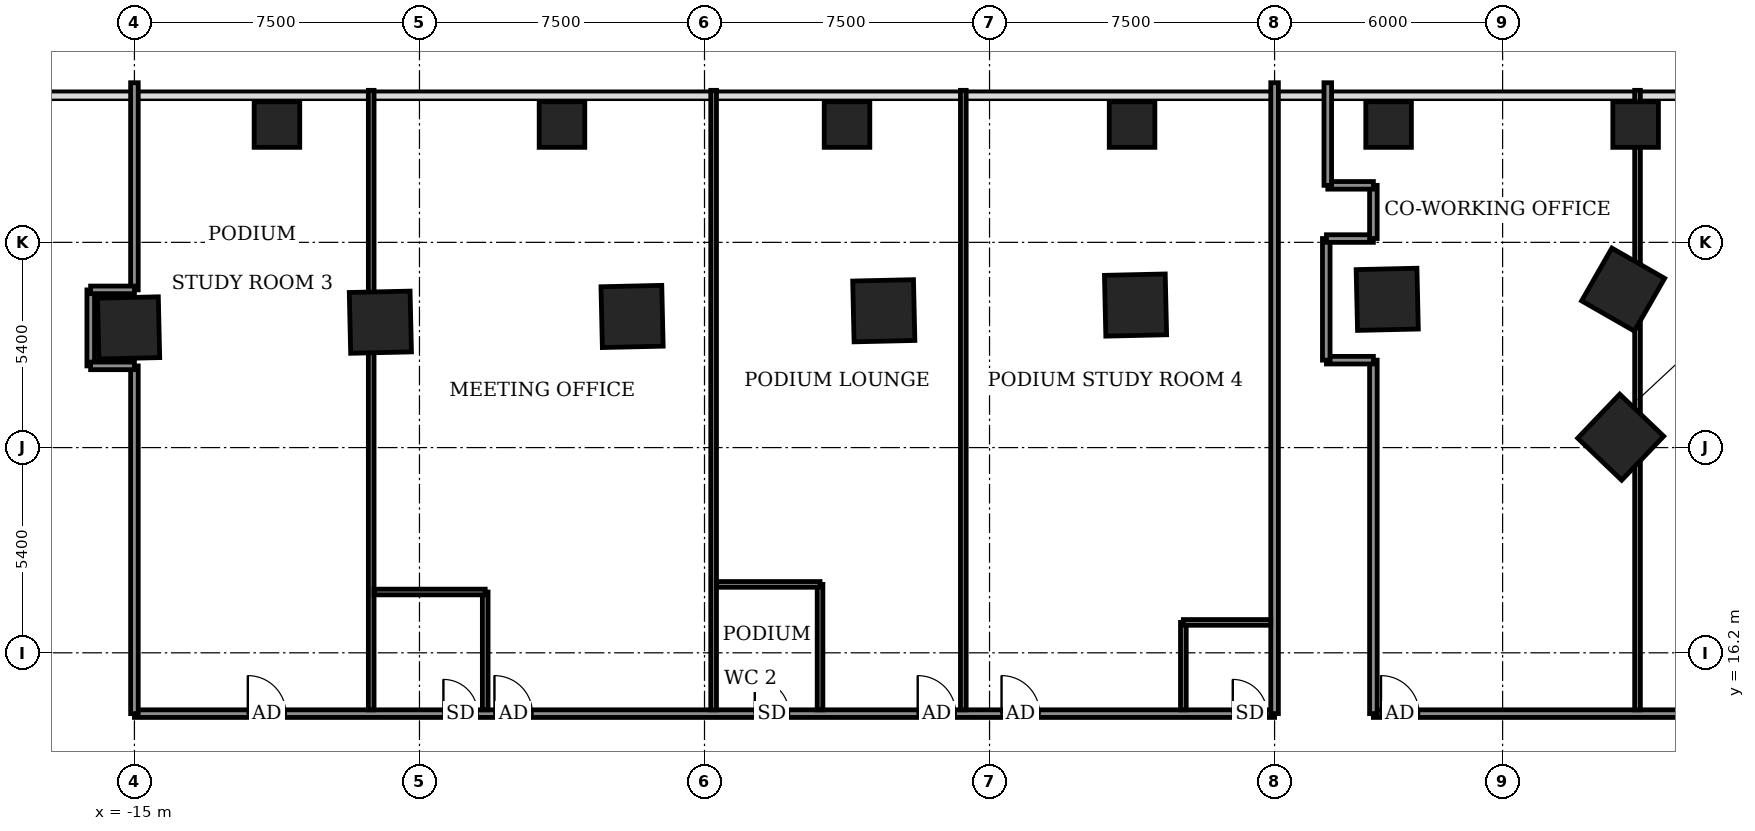
"""IFC4 building model, lengths in metres.
Left out: names, types, materials, properties, quantities, classifications, styles, units other than length and angle.
Written with IfcOpenShell. Run it as: python <this file> out.ifc"""

import sys

from ifc_helpers import new_model, si_unit, direction, frame, frame_2d, origin, origin_2d, place, context, subcontext, project, spatial, rectangle, extrude, element, fill, save


model = new_model("IFC4")
c1 = context("Model", 3, precision=1e-05, world=origin(), true_north=direction((0.0, 1.0)))
c2 = subcontext(c1, "Body", "Model", "MODEL_VIEW")
j1 = project(units=[si_unit("LENGTHUNIT", "METRE"), si_unit("PLANEANGLEUNIT", "RADIAN")], contexts=[c1])
p1 = place(None, origin())
s1 = spatial("IfcSite", under=j1, at=p1, CompositionType="ELEMENT")
p2 = place(p1, origin())
s2 = spatial("IfcBuilding", under=s1, at=p2, CompositionType="ELEMENT")
p3 = place(p2, frame((0.0, 0.0, 11.0)))
s3 = spatial("IfcBuildingStorey", under=s2, at=p3, CompositionType="ELEMENT", Elevation=11.0)
for number, where, z_axis, x_axis in (
    (1, (24.107, 21.874, -0.55), (0.0, 0.0, 1.0), (-0.723, 0.691, 0.0)),
    (2, (24.171, 25.757, -0.55), (0.0, 0.0, 1.0), (-0.868, 0.497, 0.0)),
    (3, (17.964, 25.501, -0.55), (0.0, 0.0, 1.0), (-1.0, -0.023, 0.0)),
    (4, (11.341, 25.35, -0.55), (0.0, 0.0, 1.0), (-1.0, -0.023, 0.0)),
    (5, (4.717, 25.2, -0.55), (0.0, 0.0, 1.0), (-1.0, -0.023, 0.0)),
    (6, (-1.906, 25.05, -0.55), (0.0, 0.0, 1.0), (-1.0, -0.023, 0.0)),
    (7, (-8.529, 24.899, -0.55), (0.0, 0.0, 1.0), (-1.0, -0.023, 0.0)),
    (8, (-15.153, 24.749, -0.55), (0.0, 0.0, 1.0), (-1.0, -0.023, 0.0)),
):
    element("IfcColumn", number, at=place(p3, frame(where, z_axis=z_axis, x_axis=x_axis)), inside=s3, PredefinedType="COLUMN", context=c2, shape_type="SweptSolid", body=[
        extrude(rectangle(XDim=1.6, YDim=1.6, at=origin_2d()), origin(), (0.0, 0.0, 1.0), 5.0),
    ])
for number, where, z_axis, x_axis in (
    (9, (-11.25, 30.1, -0.55), (0.0, 0.0, 1.0), (1.0, 0.0, 0.0)),
    (10, (-3.75, 30.1, -0.55), (0.0, 0.0, 1.0), (1.0, 0.0, 0.0)),
    (11, (3.75, 30.1, -0.55), (0.0, 0.0, 1.0), (1.0, 0.0, 0.0)),
    (12, (11.25, 30.1, -0.55), (0.0, 0.0, 1.0), (1.0, 0.0, 0.0)),
    (13, (18.0, 30.1, -0.55), (0.0, 0.0, 1.0), (1.0, 0.0, 0.0)),
    (14, (24.5, 30.1, -0.55), (0.0, 0.0, 1.0), (1.0, 0.0, 0.0)),
):
    element("IfcColumn", number, at=place(p3, frame(where, z_axis=z_axis, x_axis=x_axis)), inside=s3, PredefinedType="COLUMN", context=c2, shape_type="SweptSolid", body=[
        extrude(rectangle(XDim=1.2, YDim=1.2, at=origin_2d()), origin(), (0.0, 0.0, 1.0), 5.0),
    ])
p4 = place(p3, frame((-15.0, 14.6, 0.0), z_axis=(0.0, 0.0, 1.0), x_axis=(1.0, 0.0, 0.0)))
e15 = element("IfcWall", 15, at=p4, inside=s3, PredefinedType="PARTITIONING", context=c2, shape_type="SweptSolid", body=[
    extrude(rectangle(XDim=30.0, YDim=0.2, at=frame_2d((15.0, 0.0))), origin(), (0.0, 0.0, 1.0), 4.45),
])
p5 = place(p4, frame((2.984, 0.0, 0.0)))
e16 = element("IfcOpeningElement", 16, at=p5, cuts=e15, PredefinedType="OPENING", context=c2, shape_type="SweptSolid", body=[
    extrude(rectangle(XDim=1.0, YDim=2.1, at=frame_2d((0.5, 1.05))), frame((0.0, 0.11, 0.0), z_axis=(0.0, -1.0, 0.0), x_axis=(1.0, 0.0, 0.0)), (0.0, 0.0, 1.0), 0.22),
])
p6 = place(p4, frame((9.473, 0.0, 0.0)))
e17 = element("IfcOpeningElement", 17, at=p6, cuts=e15, PredefinedType="OPENING", context=c2, shape_type="SweptSolid", body=[
    extrude(rectangle(XDim=1.0, YDim=2.1, at=frame_2d((0.5, 1.05))), frame((0.0, 0.11, 0.0), z_axis=(0.0, -1.0, 0.0), x_axis=(1.0, 0.0, 0.0)), (0.0, 0.0, 1.0), 0.22),
])
p7 = place(p4, frame((8.13, 0.0, 0.0)))
e18 = element("IfcOpeningElement", 18, at=p7, cuts=e15, PredefinedType="OPENING", context=c2, shape_type="SweptSolid", body=[
    extrude(rectangle(XDim=0.9, YDim=2.1, at=frame_2d((0.45, 1.05))), frame((0.0, 0.11, 0.0), z_axis=(0.0, -1.0, 0.0), x_axis=(1.0, 0.0, 0.0)), (0.0, 0.0, 1.0), 0.22),
])
p8 = place(p4, frame((20.61, 0.0, 0.0)))
e19 = element("IfcOpeningElement", 19, at=p8, cuts=e15, PredefinedType="OPENING", context=c2, shape_type="SweptSolid", body=[
    extrude(rectangle(XDim=1.0, YDim=2.1, at=frame_2d((0.5, 1.05))), frame((0.0, 0.11, 0.0), z_axis=(0.0, -1.0, 0.0), x_axis=(1.0, 0.0, 0.0)), (0.0, 0.0, 1.0), 0.22),
])
p9 = place(p4, frame((16.323, 0.0, 0.0)))
e20 = element("IfcOpeningElement", 20, at=p9, cuts=e15, PredefinedType="OPENING", context=c2, shape_type="SweptSolid", body=[
    extrude(rectangle(XDim=0.9, YDim=2.1, at=frame_2d((0.45, 1.05))), frame((0.0, 0.11, 0.0), z_axis=(0.0, -1.0, 0.0), x_axis=(1.0, 0.0, 0.0)), (0.0, 0.0, 1.0), 0.22),
])
p10 = place(p4, frame((22.816, 0.0, 0.0)))
e21 = element("IfcOpeningElement", 21, at=p10, cuts=e15, PredefinedType="OPENING", context=c2, shape_type="SweptSolid", body=[
    extrude(rectangle(XDim=1.0, YDim=2.1, at=frame_2d((0.5, 1.05))), frame((0.0, 0.11, 0.0), z_axis=(0.0, -1.0, 0.0), x_axis=(1.0, 0.0, 0.0)), (0.0, 0.0, 1.0), 0.22),
])
p11 = place(p4, frame((28.9, 0.0, 0.0)))
e22 = element("IfcOpeningElement", 22, at=p11, cuts=e15, PredefinedType="OPENING", context=c2, shape_type="SweptSolid", body=[
    extrude(rectangle(XDim=0.9, YDim=2.1, at=frame_2d((0.45, 1.05))), frame((0.0, 0.11, 0.0), z_axis=(0.0, -1.0, 0.0), x_axis=(1.0, 0.0, 0.0)), (0.0, 0.0, 1.0), 0.22),
])
p12 = place(p3, frame((-15.0, 14.6, 0.0), z_axis=(0.0, 0.0, 1.0), x_axis=(0.0, 1.0, 0.0)))
e23 = element("IfcWall", 23, at=p12, inside=s3, PredefinedType="PARTITIONING", context=c2, shape_type="SweptSolid", body=[
    extrude(rectangle(XDim=9.149, YDim=0.2, at=frame_2d((4.574, 0.0))), origin(), (0.0, 0.0, 1.0), 4.45),
])
p13 = place(p3, frame((-8.77, 14.7, 0.0), z_axis=(0.0, 0.0, 1.0), x_axis=(0.0, 1.0, 0.0)))
e24 = element("IfcWall", 24, at=p13, inside=s3, PredefinedType="PARTITIONING", context=c2, shape_type="SweptSolid", body=[
    extrude(rectangle(XDim=16.3, YDim=0.15, at=frame_2d((8.15, 0.0))), origin(), (0.0, 0.0, 1.0), 0.94),
])
p14 = place(p3, frame((-5.77, 14.7, 0.0), z_axis=(0.0, 0.0, 1.0), x_axis=(0.0, 1.0, 0.0)))
e25 = element("IfcWall", 25, at=p14, inside=s3, PredefinedType="PARTITIONING", context=c2, shape_type="SweptSolid", body=[
    extrude(rectangle(XDim=3.1, YDim=0.15, at=frame_2d((1.55, 0.0))), origin(), (0.0, 0.0, 1.0), 4.45),
])
p15 = place(p3, frame((0.24, 14.7, 0.0), z_axis=(0.0, 0.0, 1.0), x_axis=(0.0, 1.0, 0.0)))
e26 = element("IfcWall", 26, at=p15, inside=s3, PredefinedType="PARTITIONING", context=c2, shape_type="SweptSolid", body=[
    extrude(rectangle(XDim=16.3, YDim=0.15, at=frame_2d((8.15, 0.0))), origin(), (0.0, 0.0, 1.0), 0.94),
])
p16 = place(p3, frame((3.04, 14.7, 0.0), z_axis=(0.0, 0.0, 1.0), x_axis=(0.0, 1.0, 0.0)))
e27 = element("IfcWall", 27, at=p16, inside=s3, PredefinedType="PARTITIONING", context=c2, shape_type="SweptSolid", body=[
    extrude(rectangle(XDim=3.3, YDim=0.15, at=frame_2d((1.65, 0.0))), origin(), (0.0, 0.0, 1.0), 4.45),
])
p17 = place(p3, frame((6.81, 14.7, 0.0), z_axis=(0.0, 0.0, 1.0), x_axis=(0.0, 1.0, 0.0)))
e28 = element("IfcWall", 28, at=p17, inside=s3, PredefinedType="PARTITIONING", context=c2, shape_type="SweptSolid", body=[
    extrude(rectangle(XDim=16.3, YDim=0.15, at=frame_2d((8.15, 0.0))), origin(), (0.0, 0.0, 1.0), 0.94),
])
p18 = place(p3, frame((12.6, 14.7, 0.0), z_axis=(0.0, 0.0, 1.0), x_axis=(0.0, 1.0, 0.0)))
e29 = element("IfcWall", 29, at=p18, inside=s3, PredefinedType="PARTITIONING", context=c2, shape_type="SweptSolid", body=[
    extrude(rectangle(XDim=2.3, YDim=0.15, at=frame_2d((1.15, 0.0))), origin(), (0.0, 0.0, 1.0), 4.45),
])
p19 = place(p3, frame((15.0, 14.6, 0.0), z_axis=(0.0, 0.0, 1.0), x_axis=(0.0, 1.0, 0.0)))
e30 = element("IfcWall", 30, at=p19, inside=s3, PredefinedType="PARTITIONING", context=c2, shape_type="SweptSolid", body=[
    extrude(rectangle(XDim=16.6, YDim=0.2, at=frame_2d((8.3, 0.0))), origin(), (0.0, 0.0, 1.0), 0.94),
])
p20 = place(p3, frame((17.6, 14.6, 0.0), z_axis=(0.0, 0.0, 1.0), x_axis=(1.0, 0.0, 0.0)))
e31 = element("IfcWall", 31, at=p20, inside=s3, PredefinedType="PARTITIONING", context=c2, shape_type="SweptSolid", body=[
    extrude(rectangle(XDim=16.7, YDim=0.2, at=frame_2d((8.35, 0.0))), origin(), (0.0, 0.0, 1.0), 4.45),
])
p21 = place(p20, frame((13.22, 0.0, 0.0)))
e32 = element("IfcOpeningElement", 32, at=p21, cuts=e31, PredefinedType="OPENING", context=c2, shape_type="SweptSolid", body=[
    extrude(rectangle(XDim=1.0, YDim=2.1, at=frame_2d((0.5, 1.05))), frame((0.0, 0.11, 0.0), z_axis=(0.0, -1.0, 0.0), x_axis=(1.0, 0.0, 0.0)), (0.0, 0.0, 1.0), 0.22),
])
p22 = place(p20, frame((0.2, 0.0, 0.0)))
e33 = element("IfcOpeningElement", 33, at=p22, cuts=e31, PredefinedType="OPENING", context=c2, shape_type="SweptSolid", body=[
    extrude(rectangle(XDim=1.0, YDim=2.1, at=frame_2d((0.5, 1.05))), frame((0.0, 0.11, 0.0), z_axis=(0.0, -1.0, 0.0), x_axis=(1.0, 0.0, 0.0)), (0.0, 0.0, 1.0), 0.22),
])
p23 = place(p3, frame((17.6, 14.6, 0.0), z_axis=(0.0, 0.0, 1.0), x_axis=(0.0, 1.0, 0.0)))
e34 = element("IfcWall", 34, at=p23, inside=s3, PredefinedType="PARTITIONING", context=c2, shape_type="SweptSolid", body=[
    extrude(rectangle(XDim=9.301, YDim=0.2, at=frame_2d((4.65, 0.0))), origin(), (0.0, 0.0, 1.0), 4.45),
])
p24 = place(p3, frame((24.55, 14.7, 0.0), z_axis=(0.0, 0.0, 1.0), x_axis=(0.0, 1.0, 0.0)))
e35 = element("IfcWall", 35, at=p24, inside=s3, PredefinedType="PARTITIONING", context=c2, shape_type="SweptSolid", body=[
    extrude(rectangle(XDim=16.3, YDim=0.15, at=frame_2d((8.15, 0.0))), origin(), (0.0, 0.0, 1.0), 0.94),
])
p25 = place(p3, frame((12.6, 17.0, 0.0), z_axis=(0.0, 0.0, 1.0), x_axis=(1.0, 0.0, 0.0)))
e36 = element("IfcWall", 36, at=p25, inside=s3, PredefinedType="PARTITIONING", context=c2, shape_type="SweptSolid", body=[
    extrude(rectangle(XDim=2.3, YDim=0.15, at=frame_2d((1.15, 0.0))), origin(), (0.0, 0.0, 1.0), 4.45),
])
p26 = place(p3, frame((-8.695, 17.8, 0.0), z_axis=(0.0, 0.0, 1.0), x_axis=(1.0, 0.0, 0.0)))
e37 = element("IfcWall", 37, at=p26, inside=s3, PredefinedType="PARTITIONING", context=c2, shape_type="SweptSolid", body=[
    extrude(rectangle(XDim=2.925, YDim=0.15, at=frame_2d((1.462, 0.0))), origin(), (0.0, 0.0, 1.0), 4.45),
])
p27 = place(p3, frame((0.315, 18.0, 0.0), z_axis=(0.0, 0.0, 1.0), x_axis=(1.0, 0.0, 0.0)))
e38 = element("IfcWall", 38, at=p27, inside=s3, PredefinedType="PARTITIONING", context=c2, shape_type="SweptSolid", body=[
    extrude(rectangle(XDim=2.725, YDim=0.15, at=frame_2d((1.363, 0.0))), origin(), (0.0, 0.0, 1.0), 4.45),
])
p28 = place(p3, frame((-16.15, 23.749, 0.0), z_axis=(0.0, 0.0, 1.0), x_axis=(0.0, 1.0, 0.0)))
e39 = element("IfcWall", 39, at=p28, inside=s3, PredefinedType="PARTITIONING", context=c2, shape_type="SweptSolid", body=[
    extrude(rectangle(XDim=2.0, YDim=0.2, at=frame_2d((1.0, 0.0))), origin(), (0.0, 0.0, 1.0), 4.45),
])
p29 = place(p3, frame((-16.153, 23.75, 0.0), z_axis=(0.0, 0.0, 1.0), x_axis=(1.0, 0.0, 0.0)))
e40 = element("IfcWall", 40, at=p29, inside=s3, PredefinedType="PARTITIONING", context=c2, shape_type="SweptSolid", body=[
    extrude(rectangle(XDim=1.153, YDim=0.2, at=frame_2d((0.577, 0.0))), origin(), (0.0, 0.0, 1.0), 4.45),
])
p30 = place(p3, frame((16.364, 23.9, 0.0), z_axis=(0.0, 0.0, 1.0), x_axis=(1.0, 0.0, 0.0)))
e41 = element("IfcWall", 41, at=p30, inside=s3, PredefinedType="PARTITIONING", context=c2, shape_type="SweptSolid", body=[
    extrude(rectangle(XDim=1.236, YDim=0.2, at=frame_2d((0.618, 0.0))), origin(), (0.0, 0.0, 1.0), 4.45),
])
p31 = place(p3, frame((16.36, 23.901, 0.0), z_axis=(0.0, 0.0, 1.0), x_axis=(0.0, 1.0, 0.0)))
e42 = element("IfcWall", 42, at=p31, inside=s3, PredefinedType="PARTITIONING", context=c2, shape_type="SweptSolid", body=[
    extrude(rectangle(XDim=3.2, YDim=0.2, at=frame_2d((1.6, 0.0))), origin(), (0.0, 0.0, 1.0), 4.45),
])
p32 = place(p3, frame((-15.0, 25.749, 0.0), z_axis=(0.0, 0.0, 1.0), x_axis=(0.0, 1.0, 0.0)))
e43 = element("IfcWall", 43, at=p32, inside=s3, PredefinedType="PARTITIONING", context=c2, shape_type="SweptSolid", body=[
    extrude(rectangle(XDim=5.451, YDim=0.2, at=frame_2d((2.726, 0.0))), origin(), (0.0, 0.0, 1.0), 0.94),
])
p33 = place(p3, frame((-16.153, 25.75, 0.0), z_axis=(0.0, 0.0, 1.0), x_axis=(1.0, 0.0, 0.0)))
e44 = element("IfcWall", 44, at=p33, inside=s3, PredefinedType="PARTITIONING", context=c2, shape_type="SweptSolid", body=[
    extrude(rectangle(XDim=1.153, YDim=0.2, at=frame_2d((0.577, 0.0))), origin(), (0.0, 0.0, 1.0), 4.45),
])
p34 = place(p3, frame((16.364, 27.1, 0.0), z_axis=(0.0, 0.0, 1.0), x_axis=(1.0, 0.0, 0.0)))
e45 = element("IfcWall", 45, at=p34, inside=s3, PredefinedType="PARTITIONING", context=c2, shape_type="SweptSolid", body=[
    extrude(rectangle(XDim=1.236, YDim=0.2, at=frame_2d((0.618, 0.0))), origin(), (0.0, 0.0, 1.0), 4.45),
])
p35 = place(p3, frame((17.6, 27.101, 0.0), z_axis=(0.0, 0.0, 1.0), x_axis=(0.0, 1.0, 0.0)))
e46 = element("IfcWall", 46, at=p35, inside=s3, PredefinedType="PARTITIONING", context=c2, shape_type="SweptSolid", body=[
    extrude(rectangle(XDim=1.399, YDim=0.2, at=frame_2d((0.699, 0.0))), origin(), (0.0, 0.0, 1.0), 4.45),
])
p36 = place(p3, frame((16.4, 28.5, 0.0), z_axis=(0.0, 0.0, 1.0), x_axis=(1.0, 0.0, 0.0)))
e47 = element("IfcWall", 47, at=p36, inside=s3, PredefinedType="PARTITIONING", context=c2, shape_type="SweptSolid", body=[
    extrude(rectangle(XDim=1.2, YDim=0.2, at=frame_2d((0.6, 0.0))), origin(), (0.0, 0.0, 1.0), 4.45),
])
p37 = place(p3, frame((16.4, 28.5, 0.0), z_axis=(0.0, 0.0, 1.0), x_axis=(0.0, 1.0, 0.0)))
e48 = element("IfcWall", 48, at=p37, inside=s3, PredefinedType="PARTITIONING", context=c2, shape_type="SweptSolid", body=[
    extrude(rectangle(XDim=2.7, YDim=0.2, at=frame_2d((1.35, 0.0))), origin(), (0.0, 0.0, 1.0), 0.94),
])
p38 = place(p5, origin())
e49 = element("IfcDoor", 49, at=p38, inside=s3, OperationType="SINGLE_SWING_RIGHT", PredefinedType="DOOR", context=c2, shape_type="SweptSolid", body=[
    extrude(rectangle(XDim=1.0, YDim=2.1, at=frame_2d((0.5, 1.05))), frame((0.0, 0.025, 0.0), z_axis=(0.0, -1.0, 0.0), x_axis=(1.0, 0.0, 0.0)), (0.0, 0.0, 1.0), 0.05),
])
fill(e16, e49)
p39 = place(p6, origin())
e50 = element("IfcDoor", 50, at=p39, inside=s3, OperationType="SINGLE_SWING_LEFT", PredefinedType="DOOR", context=c2, shape_type="SweptSolid", body=[
    extrude(rectangle(XDim=1.0, YDim=2.1, at=frame_2d((0.5, 1.05))), frame((0.0, 0.025, 0.0), z_axis=(0.0, -1.0, 0.0), x_axis=(1.0, 0.0, 0.0)), (0.0, 0.0, 1.0), 0.05),
])
fill(e17, e50)
p40 = place(p7, origin())
e51 = element("IfcDoor", 51, at=p40, inside=s3, OperationType="SINGLE_SWING_RIGHT", PredefinedType="DOOR", context=c2, shape_type="SweptSolid", body=[
    extrude(rectangle(XDim=0.9, YDim=2.1, at=frame_2d((0.45, 1.05))), frame((0.0, 0.025, 0.0), z_axis=(0.0, -1.0, 0.0), x_axis=(1.0, 0.0, 0.0)), (0.0, 0.0, 1.0), 0.05),
])
fill(e18, e51)
p41 = place(p8, origin())
e52 = element("IfcDoor", 52, at=p41, inside=s3, OperationType="SINGLE_SWING_RIGHT", PredefinedType="DOOR", context=c2, shape_type="SweptSolid", body=[
    extrude(rectangle(XDim=1.0, YDim=2.1, at=frame_2d((0.5, 1.05))), frame((0.0, 0.025, 0.0), z_axis=(0.0, -1.0, 0.0), x_axis=(1.0, 0.0, 0.0)), (0.0, 0.0, 1.0), 0.05),
])
fill(e19, e52)
p42 = place(p9, origin())
e53 = element("IfcDoor", 53, at=p42, inside=s3, OperationType="SINGLE_SWING_LEFT", PredefinedType="DOOR", context=c2, shape_type="SweptSolid", body=[
    extrude(rectangle(XDim=0.9, YDim=2.1, at=frame_2d((0.45, 1.05))), frame((0.0, 0.025, 0.0), z_axis=(0.0, -1.0, 0.0), x_axis=(1.0, 0.0, 0.0)), (0.0, 0.0, 1.0), 0.05),
])
fill(e20, e53)
p43 = place(p10, origin())
e54 = element("IfcDoor", 54, at=p43, inside=s3, OperationType="SINGLE_SWING_LEFT", PredefinedType="DOOR", context=c2, shape_type="SweptSolid", body=[
    extrude(rectangle(XDim=1.0, YDim=2.1, at=frame_2d((0.5, 1.05))), frame((0.0, 0.025, 0.0), z_axis=(0.0, -1.0, 0.0), x_axis=(1.0, 0.0, 0.0)), (0.0, 0.0, 1.0), 0.05),
])
fill(e21, e54)
p44 = place(p11, origin())
e55 = element("IfcDoor", 55, at=p44, inside=s3, OperationType="SINGLE_SWING_RIGHT", PredefinedType="DOOR", context=c2, shape_type="SweptSolid", body=[
    extrude(rectangle(XDim=0.9, YDim=2.1, at=frame_2d((0.45, 1.05))), frame((0.0, 0.025, 0.0), z_axis=(0.0, -1.0, 0.0), x_axis=(1.0, 0.0, 0.0)), (0.0, 0.0, 1.0), 0.05),
])
fill(e22, e55)
p45 = place(p22, origin())
e56 = element("IfcDoor", 56, at=p45, inside=s3, OperationType="SINGLE_SWING_RIGHT", PredefinedType="DOOR", context=c2, shape_type="SweptSolid", body=[
    extrude(rectangle(XDim=1.0, YDim=2.1, at=frame_2d((0.5, 1.05))), frame((0.0, 0.025, 0.0), z_axis=(0.0, -1.0, 0.0), x_axis=(1.0, 0.0, 0.0)), (0.0, 0.0, 1.0), 0.05),
])
fill(e33, e56)
save(model, sys.argv[1])
